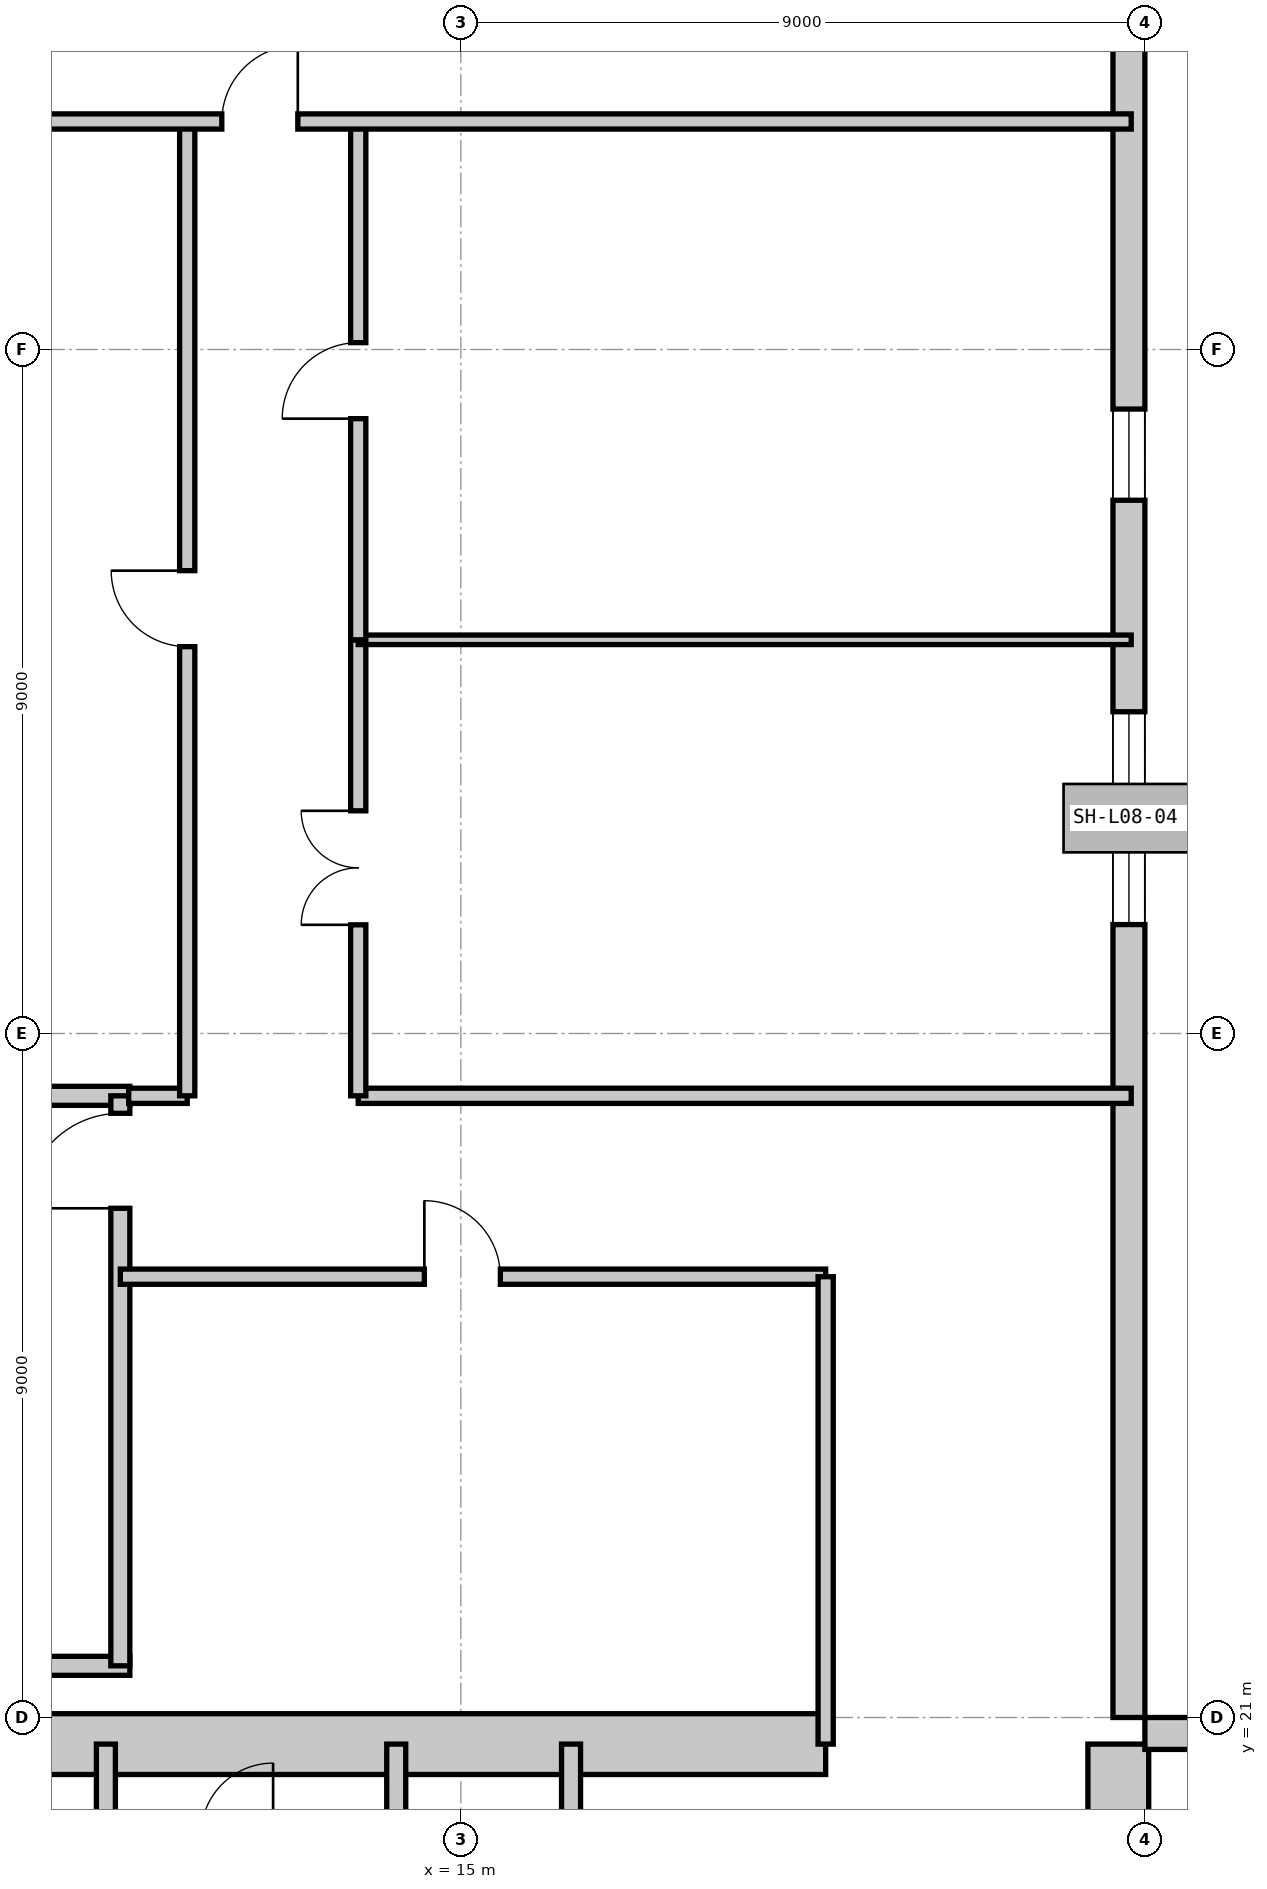
"""IFC4 building model, lengths in metres.
Left out: names, types, materials, properties, quantities, classifications, styles, units other than length and angle.
Written with IfcOpenShell. Run it as: python <this file> out.ifc"""

import sys

from ifc_helpers import new_model, si_unit, direction, frame, frame_2d, origin, origin_2d, place, context, subcontext, project, spatial, rectangle, extrude, element, fill, save


model = new_model("IFC4")
c1 = context("Model", 3, precision=1e-05, world=origin(), true_north=direction((0.0, 1.0)))
c2 = subcontext(c1, "Body", "Model", "MODEL_VIEW")
j1 = project(units=[si_unit("LENGTHUNIT", "METRE"), si_unit("PLANEANGLEUNIT", "RADIAN")], contexts=[c1])
p1 = place(None, origin())
s1 = spatial("IfcSite", under=j1, at=p1, CompositionType="ELEMENT")
p2 = place(p1, origin())
s2 = spatial("IfcBuilding", under=s1, at=p2, CompositionType="ELEMENT")
p3 = place(p2, frame((0.0, 0.0, 38.4)))
s3 = spatial("IfcBuildingStorey", under=s2, at=p3, CompositionType="ELEMENT", Elevation=38.4)
p4 = place(p3, frame((7.475, 20.65, 0.0), z_axis=(0.0, 0.0, 1.0), x_axis=(1.0, 0.0, 0.0)))
e1 = element("IfcWall", 1, at=p4, inside=s3, PredefinedType="SHEAR", context=c2, shape_type="SweptSolid", body=[
    extrude(rectangle(XDim=12.325, YDim=0.8, at=frame_2d((6.163, 0.0))), origin(), (0.0, 0.0, 1.0), 4.2),
])
p5 = place(p3, frame((23.65, 16.6, 0.0), z_axis=(0.0, 0.0, 1.0), x_axis=(0.0, 1.0, 0.0)))
e2 = element("IfcWall", 2, at=p5, inside=s3, PredefinedType="SHEAR", context=c2, shape_type="SweptSolid", body=[
    extrude(rectangle(XDim=4.05, YDim=0.8, at=frame_2d((2.025, 0.0))), origin(), (0.0, 0.0, 1.0), 4.2),
])
for number, where, z_axis, x_axis in (
    (3, (24.0, 21.0, 0.0), (0.0, 0.0, 1.0), (1.0, 0.0, 0.0)),
    (4, (24.0, 24.0, 0.0), (0.0, 0.0, 1.0), (1.0, 0.0, 0.0)),
    (5, (24.0, 30.0, 0.0), (0.0, 0.0, 1.0), (1.0, 0.0, 0.0)),
    (6, (24.0, 36.0, 0.0), (0.0, 0.0, 1.0), (1.0, 0.0, 0.0)),
    (7, (24.0, 39.0, 0.0), (0.0, 0.0, 1.0), (1.0, 0.0, 0.0)),
    (8, (24.0, 42.0, 0.0), (0.0, 0.0, 1.0), (1.0, 0.0, 0.0)),
):
    element("IfcColumn", number, at=place(p3, frame(where, z_axis=z_axis, x_axis=x_axis)), inside=s3, PredefinedType="COLUMN", context=c2, shape_type="SweptSolid", body=[
        extrude(rectangle(XDim=1.2, YDim=1.2, at=origin_2d()), origin(), (0.0, 0.0, 1.0), 4.2),
    ])
p6 = place(p3, frame((64.4, 20.79, 0.0), z_axis=(0.0, 0.0, 1.0), x_axis=(-1.0, 0.0, 0.0)))
e9 = element("IfcWall", 9, at=p6, inside=s3, PredefinedType="STANDARD", context=c2, shape_type="SweptSolid", body=[
    extrude(rectangle(XDim=40.4, YDim=0.42, at=frame_2d((20.2, 0.0))), origin(), (0.0, 0.0, 1.0), 3.98),
])
p7 = place(p6, frame((26.375, 0.0, 0.85)))
e10 = element("IfcOpeningElement", 10, at=p7, cuts=e9, PredefinedType="OPENING", context=c2, shape_type="SweptSolid", body=[
    extrude(rectangle(XDim=2.8, YDim=2.45, at=frame_2d((1.4, 1.225))), frame((0.0, 0.22, 0.0), z_axis=(0.0, -1.0, 0.0), x_axis=(1.0, 0.0, 0.0)), (0.0, 0.0, 1.0), 0.44),
])
p8 = place(p6, frame((38.222, 0.0, 0.85)))
e11 = element("IfcOpeningElement", 11, at=p8, cuts=e9, PredefinedType="OPENING", context=c2, shape_type="SweptSolid", body=[
    extrude(rectangle(XDim=1.2, YDim=2.45, at=frame_2d((0.6, 1.225))), frame((0.0, 0.22, 0.0), z_axis=(0.0, -1.0, 0.0), x_axis=(1.0, 0.0, 0.0)), (0.0, 0.0, 1.0), 0.44),
])
p9 = place(p6, frame((32.536, 0.0, 0.85)))
e12 = element("IfcOpeningElement", 12, at=p9, cuts=e9, PredefinedType="OPENING", context=c2, shape_type="SweptSolid", body=[
    extrude(rectangle(XDim=2.8, YDim=2.45, at=frame_2d((1.4, 1.225))), frame((0.0, 0.22, 0.0), z_axis=(0.0, -1.0, 0.0), x_axis=(1.0, 0.0, 0.0)), (0.0, 0.0, 1.0), 0.44),
])
p10 = place(p6, frame((17.386, 0.0, 0.85)))
e13 = element("IfcOpeningElement", 13, at=p10, cuts=e9, PredefinedType="OPENING", context=c2, shape_type="SweptSolid", body=[
    extrude(rectangle(XDim=2.8, YDim=2.45, at=frame_2d((1.4, 1.225))), frame((0.0, 0.22, 0.0), z_axis=(0.0, -1.0, 0.0), x_axis=(1.0, 0.0, 0.0)), (0.0, 0.0, 1.0), 0.44),
])
p11 = place(p3, frame((23.79, 21.0, 0.0), z_axis=(0.0, 0.0, 1.0), x_axis=(0.0, 1.0, 0.0)))
e14 = element("IfcWall", 14, at=p11, inside=s3, PredefinedType="STANDARD", context=c2, shape_type="SweptSolid", body=[
    extrude(rectangle(XDim=28.4, YDim=0.42, at=frame_2d((14.2, 0.0))), origin(), (0.0, 0.0, 1.0), 3.98),
])
p12 = place(p11, frame((10.433, 0.0, 0.85)))
e15 = element("IfcOpeningElement", 15, at=p12, cuts=e14, PredefinedType="OPENING", context=c2, shape_type="SweptSolid", body=[
    extrude(rectangle(XDim=2.8, YDim=2.45, at=frame_2d((1.4, 1.225))), frame((0.0, 0.22, 0.0), z_axis=(0.0, -1.0, 0.0), x_axis=(1.0, 0.0, 0.0)), (0.0, 0.0, 1.0), 0.44),
])
p13 = place(p11, frame((16.016, 0.0, 0.85)))
e16 = element("IfcOpeningElement", 16, at=p13, cuts=e14, PredefinedType="OPENING", context=c2, shape_type="SweptSolid", body=[
    extrude(rectangle(XDim=1.2, YDim=2.45, at=frame_2d((0.6, 1.225))), frame((0.0, 0.22, 0.0), z_axis=(0.0, -1.0, 0.0), x_axis=(1.0, 0.0, 0.0)), (0.0, 0.0, 1.0), 0.44),
])
p14 = place(p3, frame((10.33, 19.45, 0.0), z_axis=(0.0, 0.0, 1.0), x_axis=(0.0, 1.0, 0.0)))
e17 = element("IfcWall", 17, at=p14, inside=s3, PredefinedType="PARTITIONING", context=c2, shape_type="SweptSolid", body=[
    extrude(rectangle(XDim=1.2, YDim=0.25, at=frame_2d((0.6, 0.0))), origin(), (0.0, 0.0, 1.0), 3.114),
])
for number, where, z_axis, x_axis in (
    (18, (14.15, 16.7, 0.0), (0.0, 0.0, 1.0), (0.0, 1.0, 0.0)),
    (19, (16.45, 16.7, 0.0), (0.0, 0.0, 1.0), (0.0, 1.0, 0.0)),
):
    element("IfcWall", number, at=place(p3, frame(where, z_axis=z_axis, x_axis=x_axis)), inside=s3, PredefinedType="PARTITIONING", context=c2, shape_type="SweptSolid", body=[
        extrude(rectangle(XDim=3.95, YDim=0.25, at=frame_2d((1.975, 0.0))), origin(), (0.0, 0.0, 1.0), 3.97),
    ])
for number, where, z_axis, x_axis in (
    (20, (6.555, 21.68, 0.0), (0.0, 0.0, 1.0), (1.0, 0.0, 0.0)),
    (21, (6.555, 29.18, 0.0), (0.0, 0.0, 1.0), (1.0, 0.0, 0.0)),
):
    element("IfcWall", number, at=place(p3, frame(where, z_axis=z_axis, x_axis=x_axis)), inside=s3, PredefinedType="SHEAR", context=c2, shape_type="SweptSolid", body=[
        extrude(rectangle(XDim=4.09, YDim=0.25, at=frame_2d((2.045, 0.0))), origin(), (0.0, 0.0, 1.0), 4.2),
    ])
p15 = place(p3, frame((10.52, 21.68, 0.0), z_axis=(0.0, 0.0, 1.0), x_axis=(0.0, 1.0, 0.0)))
e22 = element("IfcWall", 22, at=p15, inside=s3, PredefinedType="SHEAR", context=c2, shape_type="SweptSolid", body=[
    extrude(rectangle(XDim=7.5, YDim=0.25, at=frame_2d((3.75, 0.0))), origin(), (0.0, 0.0, 1.0), 4.2),
])
p16 = place(p15, frame((6.02, 0.0, 0.0)))
e23 = element("IfcOpeningElement", 23, at=p16, cuts=e22, PredefinedType="OPENING", context=c2, shape_type="SweptSolid", body=[
    extrude(rectangle(XDim=1.25, YDim=2.2, at=frame_2d((0.625, 1.1))), frame((0.0, 0.135, 0.0), z_axis=(0.0, -1.0, 0.0), x_axis=(1.0, 0.0, 0.0)), (0.0, 0.0, 1.0), 0.27),
])
p17 = place(p3, frame((10.52, 26.8, 0.0), z_axis=(0.0, 0.0, 1.0), x_axis=(1.0, 0.0, 0.0)))
e24 = element("IfcWall", 24, at=p17, inside=s3, PredefinedType="PARTITIONING", context=c2, shape_type="SweptSolid", body=[
    extrude(rectangle(XDim=9.28, YDim=0.2, at=frame_2d((4.64, 0.0))), origin(), (0.0, 0.0, 1.0), 3.97),
])
p18 = place(p17, frame((4.0, 0.0, 0.0)))
e25 = element("IfcOpeningElement", 25, at=p18, cuts=e24, PredefinedType="OPENING", context=c2, shape_type="SweptSolid", body=[
    extrude(rectangle(XDim=1.0, YDim=2.15, at=frame_2d((0.5, 1.075))), frame((0.0, 0.11, 0.0), z_axis=(0.0, -1.0, 0.0), x_axis=(1.0, 0.0, 0.0)), (0.0, 0.0, 1.0), 0.22),
])
p19 = place(p3, frame((19.8, 20.65, 0.0), z_axis=(0.0, 0.0, 1.0), x_axis=(0.0, 1.0, 0.0)))
e26 = element("IfcWall", 26, at=p19, inside=s3, PredefinedType="PARTITIONING", context=c2, shape_type="SweptSolid", body=[
    extrude(rectangle(XDim=6.15, YDim=0.2, at=frame_2d((3.075, 0.0))), origin(), (0.0, 0.0, 1.0), 3.97),
])
p20 = place(p3, frame((10.63, 29.18, 0.0), z_axis=(0.0, 0.0, 1.0), x_axis=(1.0, 0.0, 0.0)))
e27 = element("IfcWall", 27, at=p20, inside=s3, PredefinedType="PARTITIONING", context=c2, shape_type="SweptSolid", body=[
    extrude(rectangle(XDim=0.77, YDim=0.2, at=frame_2d((0.385, 0.0))), origin(), (0.0, 0.0, 1.0), 3.97),
])
p21 = place(p3, frame((13.65, 29.18, 0.0), z_axis=(0.0, 0.0, 1.0), x_axis=(1.0, 0.0, 0.0)))
e28 = element("IfcWall", 28, at=p21, inside=s3, PredefinedType="PARTITIONING", context=c2, shape_type="SweptSolid", body=[
    extrude(rectangle(XDim=10.17, YDim=0.2, at=frame_2d((5.085, 0.0))), origin(), (0.0, 0.0, 1.0), 3.97),
])
p22 = place(p3, frame((11.4, 29.18, 0.0), z_axis=(0.0, 0.0, 1.0), x_axis=(0.0, 1.0, 0.0)))
e29 = element("IfcWall", 29, at=p22, inside=s3, PredefinedType="PARTITIONING", context=c2, shape_type="SweptSolid", body=[
    extrude(rectangle(XDim=12.82, YDim=0.2, at=frame_2d((6.41, 0.0))), origin(), (0.0, 0.0, 1.0), 3.97),
])
p23 = place(p22, frame((5.91, 0.0, 0.0)))
e30 = element("IfcOpeningElement", 30, at=p23, cuts=e29, PredefinedType="OPENING", context=c2, shape_type="SweptSolid", body=[
    extrude(rectangle(XDim=1.0, YDim=2.15, at=frame_2d((0.5, 1.075))), frame((0.0, 0.11, 0.0), z_axis=(0.0, -1.0, 0.0), x_axis=(1.0, 0.0, 0.0)), (0.0, 0.0, 1.0), 0.22),
])
p24 = place(p3, frame((13.65, 29.18, 0.0), z_axis=(0.0, 0.0, 1.0), x_axis=(0.0, 1.0, 0.0)))
e31 = element("IfcWall", 31, at=p24, inside=s3, PredefinedType="PARTITIONING", context=c2, shape_type="SweptSolid", body=[
    extrude(rectangle(XDim=6.0, YDim=0.2, at=frame_2d((3.0, 0.0))), origin(), (0.0, 0.0, 1.0), 3.97),
])
p25 = place(p24, frame((2.25, 0.0, 0.0)))
e32 = element("IfcOpeningElement", 32, at=p25, cuts=e31, PredefinedType="OPENING", context=c2, shape_type="SweptSolid", body=[
    extrude(rectangle(XDim=1.5, YDim=2.3, at=frame_2d((0.75, 1.15))), frame((0.0, 0.11, 0.0), z_axis=(0.0, -1.0, 0.0), x_axis=(1.0, 0.0, 0.0)), (0.0, 0.0, 1.0), 0.22),
])
p26 = place(p3, frame((13.65, 35.18, 0.0), z_axis=(0.0, 0.0, 1.0), x_axis=(1.0, 0.0, 0.0)))
e33 = element("IfcWall", 33, at=p26, inside=s3, PredefinedType="PARTITIONING", context=c2, shape_type="SweptSolid", body=[
    extrude(rectangle(XDim=10.17, YDim=0.125, at=frame_2d((5.085, 0.0))), origin(), (0.0, 0.0, 1.0), 3.97),
])
p27 = place(p3, frame((13.65, 35.18, 0.0), z_axis=(0.0, 0.0, 1.0), x_axis=(0.0, 1.0, 0.0)))
e34 = element("IfcWall", 34, at=p27, inside=s3, PredefinedType="PARTITIONING", context=c2, shape_type="SweptSolid", body=[
    extrude(rectangle(XDim=6.82, YDim=0.2, at=frame_2d((3.41, 0.0))), origin(), (0.0, 0.0, 1.0), 3.97),
])
p28 = place(p27, frame((2.91, 0.0, 0.0)))
e35 = element("IfcOpeningElement", 35, at=p28, cuts=e34, PredefinedType="OPENING", context=c2, shape_type="SweptSolid", body=[
    extrude(rectangle(XDim=1.0, YDim=2.15, at=frame_2d((0.5, 1.075))), frame((0.0, 0.11, 0.0), z_axis=(0.0, -1.0, 0.0), x_axis=(1.0, 0.0, 0.0)), (0.0, 0.0, 1.0), 0.22),
])
p29 = place(p3, frame((6.18, 42.0, 0.0), z_axis=(0.0, 0.0, 1.0), x_axis=(1.0, 0.0, 0.0)))
e36 = element("IfcWall", 36, at=p29, inside=s3, PredefinedType="PARTITIONING", context=c2, shape_type="SweptSolid", body=[
    extrude(rectangle(XDim=17.64, YDim=0.2, at=frame_2d((8.82, 0.0))), origin(), (0.0, 0.0, 1.0), 3.114),
])
p30 = place(p29, frame((5.675, 0.0, 0.0)))
e37 = element("IfcOpeningElement", 37, at=p30, cuts=e36, PredefinedType="OPENING", context=c2, shape_type="SweptSolid", body=[
    extrude(rectangle(XDim=1.0, YDim=2.15, at=frame_2d((0.5, 1.075))), frame((0.0, 0.11, 0.0), z_axis=(0.0, -1.0, 0.0), x_axis=(1.0, 0.0, 0.0)), (0.0, 0.0, 1.0), 0.22),
])
p31 = place(p12, origin())
e38 = element("IfcWindow", 38, at=p31, inside=s3, PartitioningType="SINGLE_PANEL", PredefinedType="WINDOW", context=c2, shape_type="SweptSolid", body=[
    extrude(rectangle(XDim=2.8, YDim=2.45, at=frame_2d((1.4, 1.225))), frame((0.0, 0.11, 0.0), z_axis=(0.0, -1.0, 0.0), x_axis=(1.0, 0.0, 0.0)), (0.0, 0.0, 1.0), 0.06),
])
fill(e15, e38)
p32 = place(p16, origin())
e39 = element("IfcDoor", 39, at=p32, inside=s3, OperationType="SINGLE_SWING_LEFT", PredefinedType="DOOR", context=c2, shape_type="SweptSolid", body=[
    extrude(rectangle(XDim=1.25, YDim=2.2, at=frame_2d((0.625, 1.1))), frame((0.0, 0.025, 0.0), z_axis=(0.0, -1.0, 0.0), x_axis=(1.0, 0.0, 0.0)), (0.0, 0.0, 1.0), 0.05),
])
fill(e23, e39)
p33 = place(p18, origin())
e40 = element("IfcDoor", 40, at=p33, inside=s3, OperationType="SINGLE_SWING_LEFT", PredefinedType="DOOR", context=c2, shape_type="SweptSolid", body=[
    extrude(rectangle(XDim=1.0, YDim=2.15, at=frame_2d((0.5, 1.075))), frame((0.0, 0.025, 0.0), z_axis=(0.0, -1.0, 0.0), x_axis=(1.0, 0.0, 0.0)), (0.0, 0.0, 1.0), 0.05),
])
fill(e25, e40)
p34 = place(p23, origin())
e41 = element("IfcDoor", 41, at=p34, inside=s3, OperationType="SINGLE_SWING_RIGHT", PredefinedType="DOOR", context=c2, shape_type="SweptSolid", body=[
    extrude(rectangle(XDim=1.0, YDim=2.15, at=frame_2d((0.5, 1.075))), frame((0.0, 0.025, 0.0), z_axis=(0.0, -1.0, 0.0), x_axis=(1.0, 0.0, 0.0)), (0.0, 0.0, 1.0), 0.05),
])
fill(e30, e41)
p35 = place(p25, origin())
e42 = element("IfcDoor", 42, at=p35, inside=s3, OperationType="DOUBLE_DOOR_SINGLE_SWING", PredefinedType="DOOR", context=c2, shape_type="SweptSolid", body=[
    extrude(rectangle(XDim=1.5, YDim=2.3, at=frame_2d((0.75, 1.15))), frame((0.0, 0.025, 0.0), z_axis=(0.0, -1.0, 0.0), x_axis=(1.0, 0.0, 0.0)), (0.0, 0.0, 1.0), 0.05),
])
fill(e32, e42)
p36 = place(p28, origin())
e43 = element("IfcDoor", 43, at=p36, inside=s3, OperationType="SINGLE_SWING_LEFT", PredefinedType="DOOR", context=c2, shape_type="SweptSolid", body=[
    extrude(rectangle(XDim=1.0, YDim=2.15, at=frame_2d((0.5, 1.075))), frame((0.0, 0.025, 0.0), z_axis=(0.0, -1.0, 0.0), x_axis=(1.0, 0.0, 0.0)), (0.0, 0.0, 1.0), 0.05),
])
fill(e35, e43)
p37 = place(p30, origin())
e44 = element("IfcDoor", 44, at=p37, inside=s3, OperationType="SINGLE_SWING_RIGHT", PredefinedType="DOOR", context=c2, shape_type="SweptSolid", body=[
    extrude(rectangle(XDim=1.0, YDim=2.15, at=frame_2d((0.5, 1.075))), frame((0.0, 0.025, 0.0), z_axis=(0.0, -1.0, 0.0), x_axis=(1.0, 0.0, 0.0)), (0.0, 0.0, 1.0), 0.05),
])
fill(e37, e44)
p38 = place(p13, origin())
e45 = element("IfcWindow", 45, at=p38, inside=s3, PartitioningType="SINGLE_PANEL", PredefinedType="WINDOW", context=c2, shape_type="SweptSolid", body=[
    extrude(rectangle(XDim=1.2, YDim=2.45, at=frame_2d((0.6, 1.225))), frame((0.0, 0.11, 0.0), z_axis=(0.0, -1.0, 0.0), x_axis=(1.0, 0.0, 0.0)), (0.0, 0.0, 1.0), 0.06),
])
fill(e16, e45)
save(model, sys.argv[1])
